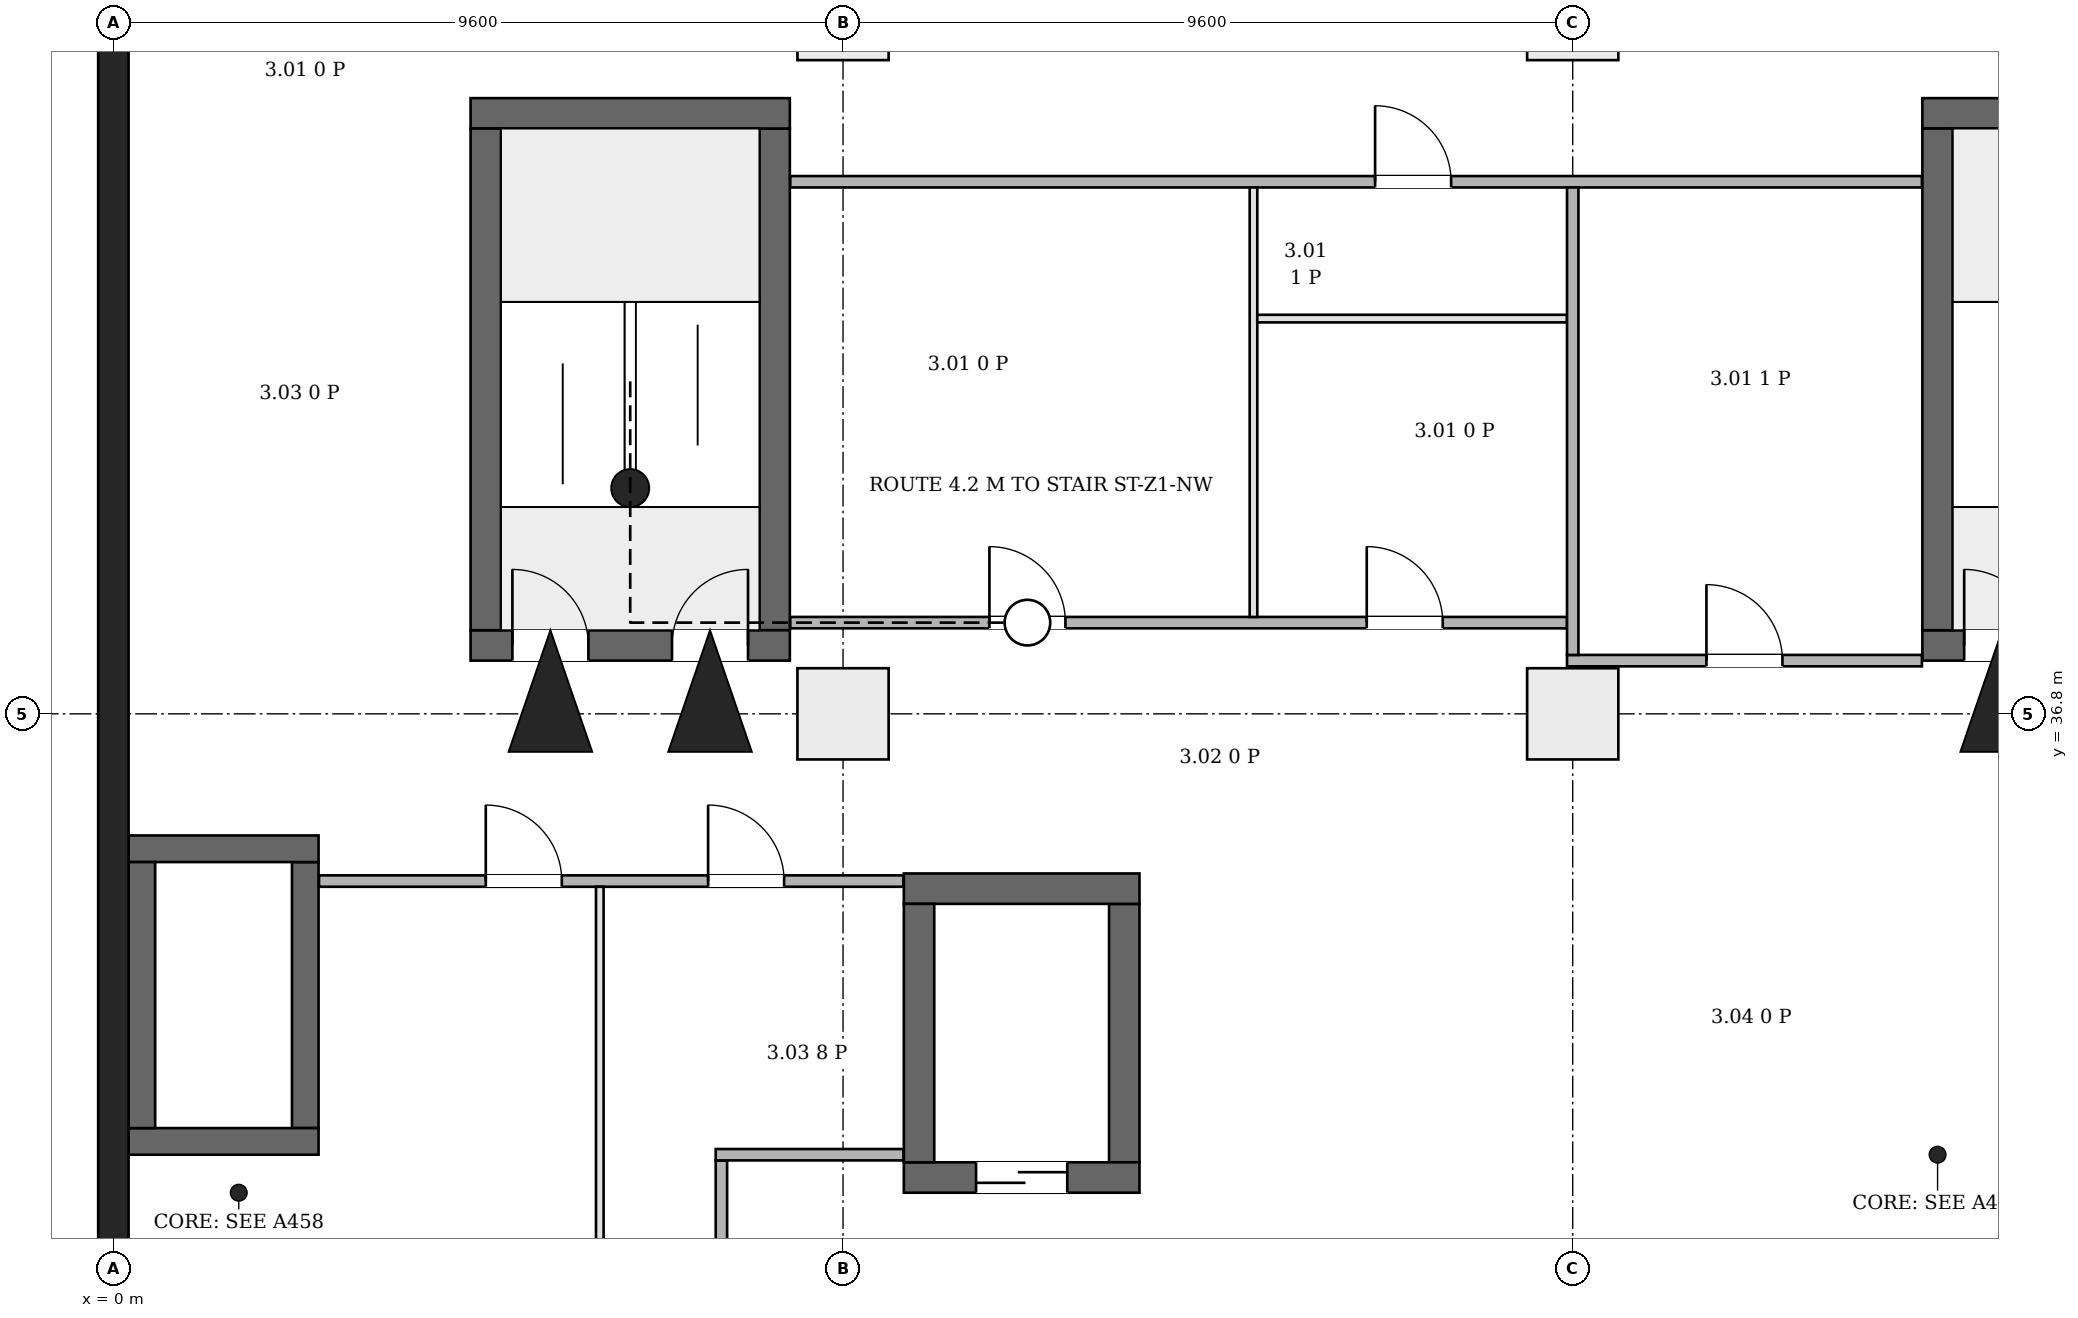
"""IFC4 building model, lengths in metres.
Left out: names, types, materials, properties, quantities, classifications, styles, units other than length and angle.
Written with IfcOpenShell. Run it as: python <this file> out.ifc"""

import sys

from ifc_helpers import new_model, si_unit, direction, frame, frame_2d, origin, origin_2d, place, context, subcontext, project, spatial, rectangle, extrude, element, fill, save


model = new_model("IFC4")
c1 = context("Model", 3, precision=1e-05, world=origin(), true_north=direction((0.0, 1.0)))
c2 = subcontext(c1, "Body", "Model", "MODEL_VIEW")
j1 = project(units=[si_unit("LENGTHUNIT", "METRE"), si_unit("PLANEANGLEUNIT", "RADIAN")], contexts=[c1])
p1 = place(None, origin())
s1 = spatial("IfcSite", under=j1, at=p1, CompositionType="ELEMENT")
p2 = place(p1, origin())
s2 = spatial("IfcBuilding", under=s1, at=p2, CompositionType="ELEMENT")
p3 = place(p2, frame((0.0, 0.0, 21.7)))
s3 = spatial("IfcBuildingStorey", under=s2, at=p3, CompositionType="ELEMENT", Elevation=21.7)
p4 = place(p3, frame((0.0, -0.2, 0.0), z_axis=(0.0, 0.0, 1.0), x_axis=(0.0, 1.0, 0.0)))
e1 = element("IfcWall", 1, at=p4, inside=s3, PredefinedType="SHEAR", context=c2, shape_type="SweptSolid", body=[
    extrude(rectangle(XDim=46.88, YDim=0.4, at=frame_2d((23.44, 0.0))), origin(), (0.0, 0.0, 1.0), 5.0),
])
p5 = place(p3, frame((4.7, 37.7, 0.0), z_axis=(0.0, 0.0, 1.0), x_axis=(1.0, 0.0, 0.0)))
e2 = element("IfcWall", 2, at=p5, inside=s3, PredefinedType="SHEAR", context=c2, shape_type="SweptSolid", body=[
    extrude(rectangle(XDim=4.2, YDim=0.4, at=frame_2d((2.1, 0.0))), origin(), (0.0, 0.0, 1.0), 5.0),
])
p6 = place(p5, frame((0.55, 0.0, 0.0)))
e3 = element("IfcOpeningElement", 3, at=p6, cuts=e2, PredefinedType="OPENING", context=c2, shape_type="SweptSolid", body=[
    extrude(rectangle(XDim=1.0, YDim=2.1, at=frame_2d((0.5, 1.05))), frame((0.0, 0.21, 0.0), z_axis=(0.0, -1.0, 0.0), x_axis=(1.0, 0.0, 0.0)), (0.0, 0.0, 1.0), 0.42),
])
p7 = place(p5, frame((2.65, 0.0, 0.0)))
e4 = element("IfcOpeningElement", 4, at=p7, cuts=e2, PredefinedType="OPENING", context=c2, shape_type="SweptSolid", body=[
    extrude(rectangle(XDim=1.0, YDim=2.1, at=frame_2d((0.5, 1.05))), frame((0.0, 0.21, 0.0), z_axis=(0.0, -1.0, 0.0), x_axis=(1.0, 0.0, 0.0)), (0.0, 0.0, 1.0), 0.42),
])
p8 = place(p3, frame((4.7, 44.7, 0.0), z_axis=(0.0, 0.0, 1.0), x_axis=(1.0, 0.0, 0.0)))
e5 = element("IfcWall", 5, at=p8, inside=s3, PredefinedType="SHEAR", context=c2, shape_type="SweptSolid", body=[
    extrude(rectangle(XDim=4.2, YDim=0.4, at=frame_2d((2.1, 0.0))), origin(), (0.0, 0.0, 1.0), 5.0),
])
for number, where, z_axis, x_axis in (
    (6, (4.9, 37.9, 0.0), (0.0, 0.0, 1.0), (0.0, 1.0, 0.0)),
    (7, (8.7, 37.9, 0.0), (0.0, 0.0, 1.0), (0.0, 1.0, 0.0)),
):
    element("IfcWall", number, at=place(p3, frame(where, z_axis=z_axis, x_axis=x_axis)), inside=s3, PredefinedType="SHEAR", context=c2, shape_type="SweptSolid", body=[
        extrude(rectangle(XDim=6.6, YDim=0.4, at=frame_2d((3.3, 0.0))), origin(), (0.0, 0.0, 1.0), 5.0),
    ])
p9 = place(p3, frame((23.8, 37.7, 0.0), z_axis=(0.0, 0.0, 1.0), x_axis=(1.0, 0.0, 0.0)))
e8 = element("IfcWall", 8, at=p9, inside=s3, PredefinedType="SHEAR", context=c2, shape_type="SweptSolid", body=[
    extrude(rectangle(XDim=4.2, YDim=0.4, at=frame_2d((2.1, 0.0))), origin(), (0.0, 0.0, 1.0), 5.0),
])
p10 = place(p9, frame((0.55, 0.0, 0.0)))
e9 = element("IfcOpeningElement", 9, at=p10, cuts=e8, PredefinedType="OPENING", context=c2, shape_type="SweptSolid", body=[
    extrude(rectangle(XDim=1.0, YDim=2.1, at=frame_2d((0.5, 1.05))), frame((0.0, 0.21, 0.0), z_axis=(0.0, -1.0, 0.0), x_axis=(1.0, 0.0, 0.0)), (0.0, 0.0, 1.0), 0.42),
])
p11 = place(p9, frame((2.65, 0.0, 0.0)))
e10 = element("IfcOpeningElement", 10, at=p11, cuts=e8, PredefinedType="OPENING", context=c2, shape_type="SweptSolid", body=[
    extrude(rectangle(XDim=1.0, YDim=2.1, at=frame_2d((0.5, 1.05))), frame((0.0, 0.21, 0.0), z_axis=(0.0, -1.0, 0.0), x_axis=(1.0, 0.0, 0.0)), (0.0, 0.0, 1.0), 0.42),
])
p12 = place(p3, frame((23.8, 44.7, 0.0), z_axis=(0.0, 0.0, 1.0), x_axis=(1.0, 0.0, 0.0)))
e11 = element("IfcWall", 11, at=p12, inside=s3, PredefinedType="SHEAR", context=c2, shape_type="SweptSolid", body=[
    extrude(rectangle(XDim=4.2, YDim=0.4, at=frame_2d((2.1, 0.0))), origin(), (0.0, 0.0, 1.0), 5.0),
])
p13 = place(p3, frame((24.0, 37.9, 0.0), z_axis=(0.0, 0.0, 1.0), x_axis=(0.0, 1.0, 0.0)))
e12 = element("IfcWall", 12, at=p13, inside=s3, PredefinedType="SHEAR", context=c2, shape_type="SweptSolid", body=[
    extrude(rectangle(XDim=6.6, YDim=0.4, at=frame_2d((3.3, 0.0))), origin(), (0.0, 0.0, 1.0), 5.0),
])
for number, where, z_axis, x_axis in (
    (13, (0.2, 31.175, 0.0), (0.0, 0.0, 1.0), (1.0, 0.0, 0.0)),
    (14, (0.2, 35.025, 0.0), (0.0, 0.0, 1.0), (1.0, 0.0, 0.0)),
):
    element("IfcWall", number, at=place(p3, frame(where, z_axis=z_axis, x_axis=x_axis)), inside=s3, PredefinedType="SHEAR", context=c2, shape_type="SweptSolid", body=[
        extrude(rectangle(XDim=2.5, YDim=0.35, at=frame_2d((1.25, 0.0))), origin(), (0.0, 0.0, 1.0), 5.0),
    ])
for number, where, z_axis, x_axis in (
    (15, (0.375, 31.35, 0.0), (0.0, 0.0, 1.0), (0.0, 1.0, 0.0)),
    (16, (2.525, 31.35, 0.0), (0.0, 0.0, 1.0), (0.0, 1.0, 0.0)),
):
    element("IfcWall", number, at=place(p3, frame(where, z_axis=z_axis, x_axis=x_axis)), inside=s3, PredefinedType="SHEAR", context=c2, shape_type="SweptSolid", body=[
        extrude(rectangle(XDim=3.5, YDim=0.35, at=frame_2d((1.75, 0.0))), origin(), (0.0, 0.0, 1.0), 5.0),
    ])
p14 = place(p3, frame((10.4, 30.7, 0.0), z_axis=(0.0, 0.0, 1.0), x_axis=(1.0, 0.0, 0.0)))
e17 = element("IfcWall", 17, at=p14, inside=s3, PredefinedType="SHEAR", context=c2, shape_type="SweptSolid", body=[
    extrude(rectangle(XDim=3.1, YDim=0.4, at=frame_2d((1.55, 0.0))), origin(), (0.0, 0.0, 1.0), 5.0),
])
p15 = place(p14, frame((0.95, 0.0, 0.0)))
e18 = element("IfcOpeningElement", 18, at=p15, cuts=e17, PredefinedType="OPENING", context=c2, shape_type="SweptSolid", body=[
    extrude(rectangle(XDim=1.2, YDim=2.1, at=frame_2d((0.6, 1.05))), frame((0.0, 0.21, 0.0), z_axis=(0.0, -1.0, 0.0), x_axis=(1.0, 0.0, 0.0)), (0.0, 0.0, 1.0), 0.42),
])
p16 = place(p3, frame((10.4, 34.5, 0.0), z_axis=(0.0, 0.0, 1.0), x_axis=(1.0, 0.0, 0.0)))
e19 = element("IfcWall", 19, at=p16, inside=s3, PredefinedType="SHEAR", context=c2, shape_type="SweptSolid", body=[
    extrude(rectangle(XDim=3.1, YDim=0.4, at=frame_2d((1.55, 0.0))), origin(), (0.0, 0.0, 1.0), 5.0),
])
for number, where, z_axis, x_axis in (
    (20, (10.6, 30.9, 0.0), (0.0, 0.0, 1.0), (0.0, 1.0, 0.0)),
    (21, (13.3, 30.9, 0.0), (0.0, 0.0, 1.0), (0.0, 1.0, 0.0)),
):
    element("IfcWall", number, at=place(p3, frame(where, z_axis=z_axis, x_axis=x_axis)), inside=s3, PredefinedType="SHEAR", context=c2, shape_type="SweptSolid", body=[
        extrude(rectangle(XDim=3.4, YDim=0.4, at=frame_2d((1.7, 0.0))), origin(), (0.0, 0.0, 1.0), 5.0),
    ])
for number, where, z_axis, x_axis in (
    (22, (9.6, 36.8, 0.0), (0.0, 0.0, 1.0), (1.0, 0.0, 0.0)),
    (23, (19.2, 36.8, 0.0), (0.0, 0.0, 1.0), (1.0, 0.0, 0.0)),
    (24, (9.6, 46.0, 0.0), (0.0, 0.0, 1.0), (1.0, 0.0, 0.0)),
    (25, (19.2, 46.0, 0.0), (0.0, 0.0, 1.0), (1.0, 0.0, 0.0)),
):
    element("IfcColumn", number, at=place(p3, frame(where, z_axis=z_axis, x_axis=x_axis)), inside=s3, PredefinedType="COLUMN", context=c2, shape_type="SweptSolid", body=[
        extrude(rectangle(XDim=1.2, YDim=1.2, at=origin_2d()), origin(), (0.0, 0.0, 1.0), 5.0),
    ])
p17 = place(p3, frame((2.706, 34.6, 0.0), z_axis=(0.0, 0.0, 1.0), x_axis=(1.0, 0.0, 0.0)))
e26 = element("IfcWall", 26, at=p17, inside=s3, PredefinedType="PARTITIONING", context=c2, shape_type="SweptSolid", body=[
    extrude(rectangle(XDim=7.688, YDim=0.15, at=frame_2d((3.844, 0.0))), origin(), (0.0, 0.0, 1.0), 4.65),
])
p18 = place(p17, frame((2.194, 0.0, 0.0)))
e27 = element("IfcOpeningElement", 27, at=p18, cuts=e26, PredefinedType="OPENING", context=c2, shape_type="SweptSolid", body=[
    extrude(rectangle(XDim=1.0, YDim=2.1, at=frame_2d((0.5, 1.05))), frame((0.0, 0.085, 0.0), z_axis=(0.0, -1.0, 0.0), x_axis=(1.0, 0.0, 0.0)), (0.0, 0.0, 1.0), 0.17),
])
p19 = place(p17, frame((5.119, 0.0, 0.0)))
e28 = element("IfcOpeningElement", 28, at=p19, cuts=e26, PredefinedType="OPENING", context=c2, shape_type="SweptSolid", body=[
    extrude(rectangle(XDim=1.0, YDim=2.1, at=frame_2d((0.5, 1.05))), frame((0.0, 0.085, 0.0), z_axis=(0.0, -1.0, 0.0), x_axis=(1.0, 0.0, 0.0)), (0.0, 0.0, 1.0), 0.17),
])
p20 = place(p3, frame((6.4, 24.875, 0.0), z_axis=(0.0, 0.0, 1.0), x_axis=(0.0, 1.0, 0.0)))
e29 = element("IfcWall", 29, at=p20, inside=s3, PredefinedType="PARTITIONING", context=c2, shape_type="SweptSolid", body=[
    extrude(rectangle(XDim=9.65, YDim=0.1, at=frame_2d((4.825, 0.0))), origin(), (0.0, 0.0, 1.0), 4.65),
])
p21 = place(p3, frame((8.0, 27.275, 0.0), z_axis=(0.0, 0.0, 1.0), x_axis=(0.0, 1.0, 0.0)))
e30 = element("IfcWall", 30, at=p21, inside=s3, PredefinedType="PARTITIONING", context=c2, shape_type="SweptSolid", body=[
    extrude(rectangle(XDim=3.65, YDim=0.15, at=frame_2d((1.825, 0.0))), origin(), (0.0, 0.0, 1.0), 4.65),
])
p22 = place(p3, frame((7.925, 31.0, 0.0), z_axis=(0.0, 0.0, 1.0), x_axis=(1.0, 0.0, 0.0)))
e31 = element("IfcWall", 31, at=p22, inside=s3, PredefinedType="PARTITIONING", context=c2, shape_type="SweptSolid", body=[
    extrude(rectangle(XDim=2.469, YDim=0.15, at=frame_2d((1.234, 0.0))), origin(), (0.0, 0.0, 1.0), 4.65),
])
p23 = place(p3, frame((8.906, 38.0, 0.0), z_axis=(0.0, 0.0, 1.0), x_axis=(1.0, 0.0, 0.0)))
e32 = element("IfcWall", 32, at=p23, inside=s3, PredefinedType="PARTITIONING", context=c2, shape_type="SweptSolid", body=[
    extrude(rectangle(XDim=10.219, YDim=0.15, at=frame_2d((5.109, 0.0))), origin(), (0.0, 0.0, 1.0), 4.65),
])
p24 = place(p23, frame((2.62, 0.0, 0.0)))
e33 = element("IfcOpeningElement", 33, at=p24, cuts=e32, PredefinedType="OPENING", context=c2, shape_type="SweptSolid", body=[
    extrude(rectangle(XDim=1.0, YDim=2.1, at=frame_2d((0.5, 1.05))), frame((0.0, 0.085, 0.0), z_axis=(0.0, -1.0, 0.0), x_axis=(1.0, 0.0, 0.0)), (0.0, 0.0, 1.0), 0.17),
])
p25 = place(p23, frame((7.584, 0.0, 0.0)))
e34 = element("IfcOpeningElement", 34, at=p25, cuts=e32, PredefinedType="OPENING", context=c2, shape_type="SweptSolid", body=[
    extrude(rectangle(XDim=1.0, YDim=2.1, at=frame_2d((0.5, 1.05))), frame((0.0, 0.085, 0.0), z_axis=(0.0, -1.0, 0.0), x_axis=(1.0, 0.0, 0.0)), (0.0, 0.0, 1.0), 0.17),
])
p26 = place(p3, frame((8.906, 43.8, 0.0), z_axis=(0.0, 0.0, 1.0), x_axis=(1.0, 0.0, 0.0)))
e35 = element("IfcWall", 35, at=p26, inside=s3, PredefinedType="PARTITIONING", context=c2, shape_type="SweptSolid", body=[
    extrude(rectangle(XDim=14.888, YDim=0.15, at=frame_2d((7.444, 0.0))), origin(), (0.0, 0.0, 1.0), 4.65),
])
p27 = place(p26, frame((7.694, 0.0, 0.0)))
e36 = element("IfcOpeningElement", 36, at=p27, cuts=e35, PredefinedType="OPENING", context=c2, shape_type="SweptSolid", body=[
    extrude(rectangle(XDim=1.0, YDim=2.1, at=frame_2d((0.5, 1.05))), frame((0.0, 0.085, 0.0), z_axis=(0.0, -1.0, 0.0), x_axis=(1.0, 0.0, 0.0)), (0.0, 0.0, 1.0), 0.17),
])
p28 = place(p3, frame((15.0, 38.075, 0.0), z_axis=(0.0, 0.0, 1.0), x_axis=(0.0, 1.0, 0.0)))
e37 = element("IfcWall", 37, at=p28, inside=s3, PredefinedType="PARTITIONING", context=c2, shape_type="SweptSolid", body=[
    extrude(rectangle(XDim=5.65, YDim=0.1, at=frame_2d((2.825, 0.0))), origin(), (0.0, 0.0, 1.0), 4.65),
])
p29 = place(p3, frame((15.05, 42.0, 0.0), z_axis=(0.0, 0.0, 1.0), x_axis=(1.0, 0.0, 0.0)))
e38 = element("IfcWall", 38, at=p29, inside=s3, PredefinedType="PARTITIONING", context=c2, shape_type="SweptSolid", body=[
    extrude(rectangle(XDim=4.075, YDim=0.1, at=frame_2d((2.038, 0.0))), origin(), (0.0, 0.0, 1.0), 4.65),
])
p30 = place(p3, frame((19.125, 37.5, 0.0), z_axis=(0.0, 0.0, 1.0), x_axis=(1.0, 0.0, 0.0)))
e39 = element("IfcWall", 39, at=p30, inside=s3, PredefinedType="PARTITIONING", context=c2, shape_type="SweptSolid", body=[
    extrude(rectangle(XDim=4.669, YDim=0.15, at=frame_2d((2.334, 0.0))), origin(), (0.0, 0.0, 1.0), 4.65),
])
p31 = place(p30, frame((1.834, 0.0, 0.0)))
e40 = element("IfcOpeningElement", 40, at=p31, cuts=e39, PredefinedType="OPENING", context=c2, shape_type="SweptSolid", body=[
    extrude(rectangle(XDim=1.0, YDim=2.1, at=frame_2d((0.5, 1.05))), frame((0.0, 0.085, 0.0), z_axis=(0.0, -1.0, 0.0), x_axis=(1.0, 0.0, 0.0)), (0.0, 0.0, 1.0), 0.17),
])
p32 = place(p3, frame((19.2, 37.575, 0.0), z_axis=(0.0, 0.0, 1.0), x_axis=(0.0, 1.0, 0.0)))
e41 = element("IfcWall", 41, at=p32, inside=s3, PredefinedType="PARTITIONING", context=c2, shape_type="SweptSolid", body=[
    extrude(rectangle(XDim=6.15, YDim=0.15, at=frame_2d((3.075, 0.0))), origin(), (0.0, 0.0, 1.0), 4.25),
])
p33 = place(p6, origin())
e42 = element("IfcDoor", 42, at=p33, inside=s3, OperationType="SINGLE_SWING_RIGHT", PredefinedType="DOOR", context=c2, shape_type="SweptSolid", body=[
    extrude(rectangle(XDim=1.0, YDim=2.1, at=frame_2d((0.5, 1.05))), frame((0.0, 0.025, 0.0), z_axis=(0.0, -1.0, 0.0), x_axis=(1.0, 0.0, 0.0)), (0.0, 0.0, 1.0), 0.05),
])
fill(e3, e42)
p34 = place(p7, origin())
e43 = element("IfcDoor", 43, at=p34, inside=s3, OperationType="SINGLE_SWING_LEFT", PredefinedType="DOOR", context=c2, shape_type="SweptSolid", body=[
    extrude(rectangle(XDim=1.0, YDim=2.1, at=frame_2d((0.5, 1.05))), frame((0.0, 0.025, 0.0), z_axis=(0.0, -1.0, 0.0), x_axis=(1.0, 0.0, 0.0)), (0.0, 0.0, 1.0), 0.05),
])
fill(e4, e43)
p35 = place(p10, origin())
e44 = element("IfcDoor", 44, at=p35, inside=s3, OperationType="SINGLE_SWING_RIGHT", PredefinedType="DOOR", context=c2, shape_type="SweptSolid", body=[
    extrude(rectangle(XDim=1.0, YDim=2.1, at=frame_2d((0.5, 1.05))), frame((0.0, 0.025, 0.0), z_axis=(0.0, -1.0, 0.0), x_axis=(1.0, 0.0, 0.0)), (0.0, 0.0, 1.0), 0.05),
])
fill(e9, e44)
p36 = place(p15, origin())
e45 = element("IfcDoor", 45, at=p36, inside=s3, OperationType="DOUBLE_DOOR_SLIDING", PredefinedType="DOOR", context=c2, shape_type="SweptSolid", body=[
    extrude(rectangle(XDim=1.2, YDim=2.1, at=frame_2d((0.6, 1.05))), frame((0.0, 0.025, 0.0), z_axis=(0.0, -1.0, 0.0), x_axis=(1.0, 0.0, 0.0)), (0.0, 0.0, 1.0), 0.05),
])
fill(e18, e45)
p37 = place(p18, origin())
e46 = element("IfcDoor", 46, at=p37, inside=s3, OperationType="SINGLE_SWING_RIGHT", PredefinedType="DOOR", context=c2, shape_type="SweptSolid", body=[
    extrude(rectangle(XDim=1.0, YDim=2.1, at=frame_2d((0.5, 1.05))), frame((0.0, 0.025, 0.0), z_axis=(0.0, -1.0, 0.0), x_axis=(1.0, 0.0, 0.0)), (0.0, 0.0, 1.0), 0.05),
])
fill(e27, e46)
p38 = place(p19, origin())
e47 = element("IfcDoor", 47, at=p38, inside=s3, OperationType="SINGLE_SWING_LEFT", PredefinedType="DOOR", context=c2, shape_type="SweptSolid", body=[
    extrude(rectangle(XDim=1.0, YDim=2.1, at=frame_2d((0.5, 1.05))), frame((0.0, 0.025, 0.0), z_axis=(0.0, -1.0, 0.0), x_axis=(1.0, 0.0, 0.0)), (0.0, 0.0, 1.0), 0.05),
])
fill(e28, e47)
p39 = place(p31, origin())
e48 = element("IfcDoor", 48, at=p39, inside=s3, OperationType="SINGLE_SWING_LEFT", PredefinedType="DOOR", context=c2, shape_type="SweptSolid", body=[
    extrude(rectangle(XDim=1.0, YDim=2.1, at=frame_2d((0.5, 1.05))), frame((0.0, 0.025, 0.0), z_axis=(0.0, -1.0, 0.0), x_axis=(1.0, 0.0, 0.0)), (0.0, 0.0, 1.0), 0.05),
])
fill(e40, e48)
p40 = place(p24, origin())
e49 = element("IfcDoor", 49, at=p40, inside=s3, OperationType="SINGLE_SWING_LEFT", PredefinedType="DOOR", context=c2, shape_type="SweptSolid", body=[
    extrude(rectangle(XDim=1.0, YDim=2.1, at=frame_2d((0.5, 1.05))), frame((0.0, 0.025, 0.0), z_axis=(0.0, -1.0, 0.0), x_axis=(1.0, 0.0, 0.0)), (0.0, 0.0, 1.0), 0.05),
])
fill(e33, e49)
p41 = place(p25, origin())
e50 = element("IfcDoor", 50, at=p41, inside=s3, OperationType="SINGLE_SWING_RIGHT", PredefinedType="DOOR", context=c2, shape_type="SweptSolid", body=[
    extrude(rectangle(XDim=1.0, YDim=2.1, at=frame_2d((0.5, 1.05))), frame((0.0, 0.025, 0.0), z_axis=(0.0, -1.0, 0.0), x_axis=(1.0, 0.0, 0.0)), (0.0, 0.0, 1.0), 0.05),
])
fill(e34, e50)
p42 = place(p27, origin())
e51 = element("IfcDoor", 51, at=p42, inside=s3, OperationType="SINGLE_SWING_LEFT", PredefinedType="DOOR", context=c2, shape_type="SweptSolid", body=[
    extrude(rectangle(XDim=1.0, YDim=2.1, at=frame_2d((0.5, 1.05))), frame((0.0, 0.025, 0.0), z_axis=(0.0, -1.0, 0.0), x_axis=(1.0, 0.0, 0.0)), (0.0, 0.0, 1.0), 0.05),
])
fill(e36, e51)
save(model, sys.argv[1])
